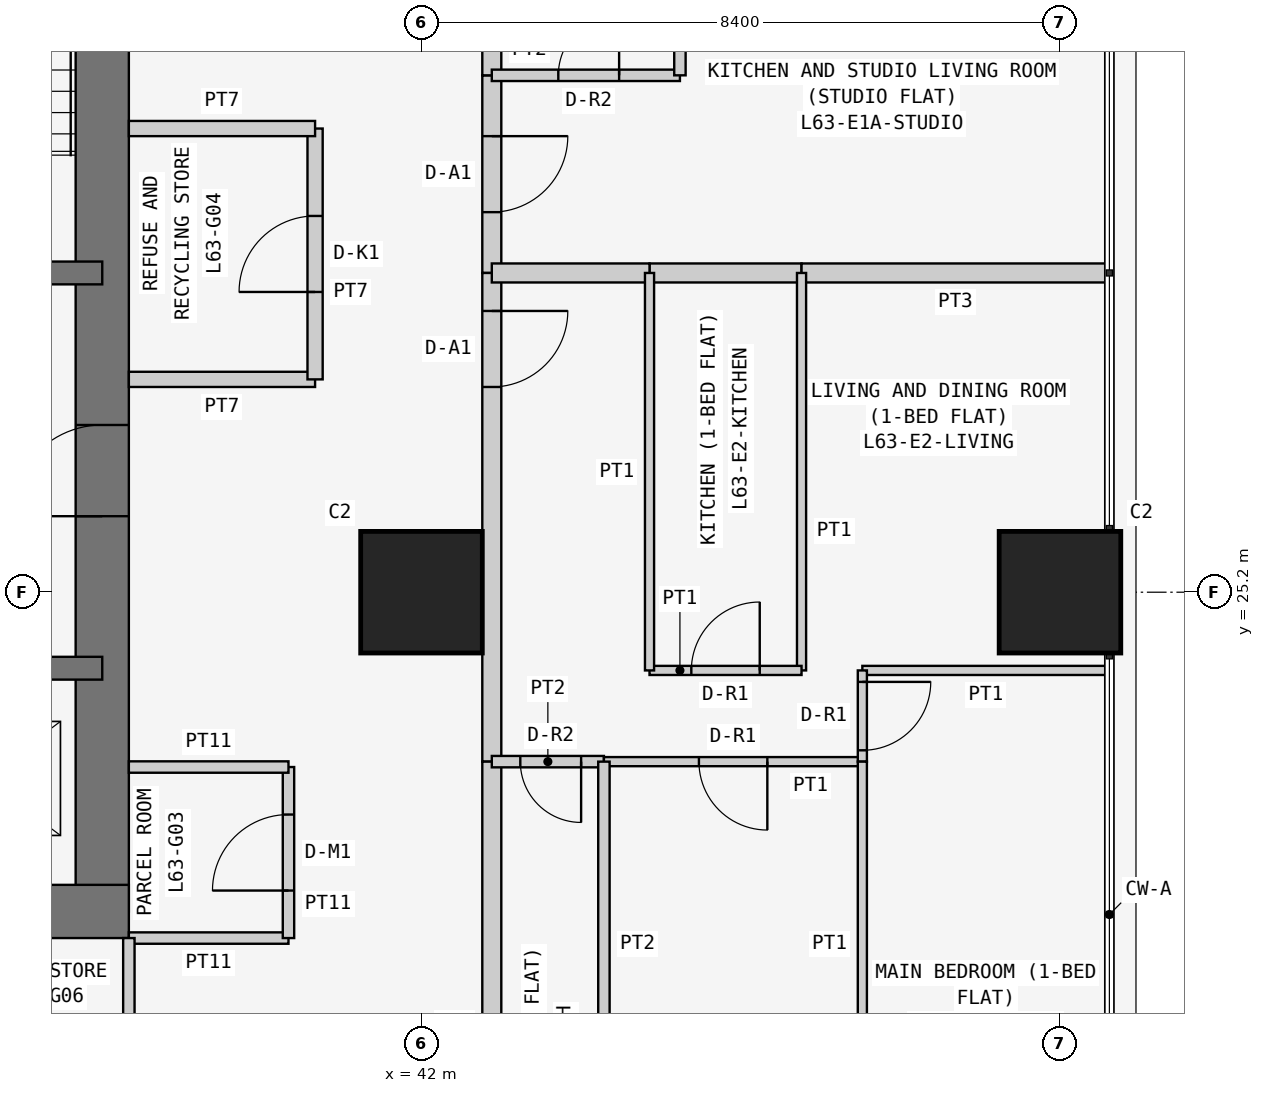
"""IFC4 building model, lengths in metres.
Left out: names, types, materials, properties, quantities, classifications, styles, units other than length and angle.
Written with IfcOpenShell. Run it as: python <this file> out.ifc"""

import sys

from ifc_helpers import new_model, si_unit, direction, frame, frame_2d, origin, origin_2d, place, context, subcontext, project, spatial, rectangle, extrude, element, fill, save


model = new_model("IFC4")
c1 = context("Model", 3, precision=1e-05, world=origin(), true_north=direction((0.0, 1.0)))
c2 = subcontext(c1, "Body", "Model", "MODEL_VIEW")
j1 = project(units=[si_unit("LENGTHUNIT", "METRE"), si_unit("PLANEANGLEUNIT", "RADIAN")], contexts=[c1])
p1 = place(None, origin())
s1 = spatial("IfcSite", under=j1, at=p1, CompositionType="ELEMENT")
p2 = place(p1, origin())
s2 = spatial("IfcBuilding", under=s1, at=p2, CompositionType="ELEMENT")
p3 = place(p2, frame((0.0, 0.0, 240.9)))
s3 = spatial("IfcBuildingStorey", under=s2, at=p3, CompositionType="ELEMENT", Elevation=240.9)
for number, where, z_axis, x_axis in (
    (1, (42.0, 25.2, 0.0), (0.0, 0.0, 1.0), (1.0, 0.0, 0.0)),
    (2, (50.4, 25.2, 0.0), (0.0, 0.0, 1.0), (1.0, 0.0, 0.0)),
):
    element("IfcColumn", number, at=place(p3, frame(where, z_axis=z_axis, x_axis=x_axis)), inside=s3, PredefinedType="COLUMN", context=c2, shape_type="SweptSolid", body=[
        extrude(rectangle(XDim=1.6, YDim=1.6, at=origin_2d()), origin(), (0.0, 0.0, 1.0), 3.6),
    ])
p4 = place(p3, frame((21.0, 21.0, 0.0), z_axis=(0.0, 0.0, 1.0), x_axis=(1.0, 0.0, 0.0)))
e3 = element("IfcWall", 3, at=p4, inside=s3, PredefinedType="SHEAR", context=c2, shape_type="SweptSolid", body=[
    extrude(rectangle(XDim=17.15, YDim=0.7, at=frame_2d((8.575, 0.0))), origin(), (0.0, 0.0, 1.0), 3.6),
])
p5 = place(p3, frame((37.8, 21.0, 0.0), z_axis=(0.0, 0.0, 1.0), x_axis=(0.0, 1.0, 0.0)))
e4 = element("IfcWall", 4, at=p5, inside=s3, PredefinedType="SHEAR", context=c2, shape_type="SweptSolid", body=[
    extrude(rectangle(XDim=17.15, YDim=0.7, at=frame_2d((8.575, 0.0))), origin(), (0.0, 0.0, 1.0), 3.6),
])
p6 = place(p5, frame((5.2, 0.0, 0.0)))
e5 = element("IfcOpeningElement", 5, at=p6, cuts=e4, PredefinedType="OPENING", context=c2, shape_type="SweptSolid", body=[
    extrude(rectangle(XDim=1.2, YDim=2.1, at=frame_2d((0.6, 1.05))), frame((0.0, 0.36, 0.0), z_axis=(0.0, -1.0, 0.0), x_axis=(1.0, 0.0, 0.0)), (0.0, 0.0, 1.0), 0.72),
])
p7 = place(p3, frame((26.6, 24.2, 0.0), z_axis=(0.0, 0.0, 1.0), x_axis=(1.0, 0.0, 0.0)))
e6 = element("IfcWall", 6, at=p7, inside=s3, PredefinedType="SHEAR", context=c2, shape_type="SweptSolid", body=[
    extrude(rectangle(XDim=11.2, YDim=0.3, at=frame_2d((5.6, 0.0))), origin(), (0.0, 0.0, 1.0), 3.6),
])
p8 = place(p7, frame((0.913, 0.0, 0.0)))
e7 = element("IfcOpeningElement", 7, at=p8, cuts=e6, PredefinedType="OPENING", context=c2, shape_type="SweptSolid", body=[
    extrude(rectangle(XDim=1.0, YDim=2.1, at=frame_2d((0.5, 1.05))), frame((0.0, 0.16, 0.0), z_axis=(0.0, -1.0, 0.0), x_axis=(1.0, 0.0, 0.0)), (0.0, 0.0, 1.0), 0.32),
])
p9 = place(p7, frame((3.75, 0.0, 0.0)))
e8 = element("IfcOpeningElement", 8, at=p9, cuts=e6, PredefinedType="OPENING", context=c2, shape_type="SweptSolid", body=[
    extrude(rectangle(XDim=0.9, YDim=2.1, at=frame_2d((0.45, 1.05))), frame((0.0, 0.16, 0.0), z_axis=(0.0, -1.0, 0.0), x_axis=(1.0, 0.0, 0.0)), (0.0, 0.0, 1.0), 0.32),
])
p10 = place(p7, frame((6.45, 0.0, 0.0)))
e9 = element("IfcOpeningElement", 9, at=p10, cuts=e6, PredefinedType="OPENING", context=c2, shape_type="SweptSolid", body=[
    extrude(rectangle(XDim=1.1, YDim=2.1, at=frame_2d((0.55, 1.05))), frame((0.0, 0.16, 0.0), z_axis=(0.0, -1.0, 0.0), x_axis=(1.0, 0.0, 0.0)), (0.0, 0.0, 1.0), 0.32),
])
p11 = place(p7, frame((9.1, 0.0, 0.0)))
e10 = element("IfcOpeningElement", 10, at=p11, cuts=e6, PredefinedType="OPENING", context=c2, shape_type="SweptSolid", body=[
    extrude(rectangle(XDim=1.1, YDim=2.1, at=frame_2d((0.55, 1.05))), frame((0.0, 0.16, 0.0), z_axis=(0.0, -1.0, 0.0), x_axis=(1.0, 0.0, 0.0)), (0.0, 0.0, 1.0), 0.32),
])
p12 = place(p3, frame((32.2, 29.4, 0.0), z_axis=(0.0, 0.0, 1.0), x_axis=(1.0, 0.0, 0.0)))
e11 = element("IfcWall", 11, at=p12, inside=s3, PredefinedType="SHEAR", context=c2, shape_type="SweptSolid", body=[
    extrude(rectangle(XDim=5.6, YDim=0.3, at=frame_2d((2.8, 0.0))), origin(), (0.0, 0.0, 1.0), 3.6),
])
p13 = place(p12, frame((2.0, 0.0, 0.0)))
e12 = element("IfcOpeningElement", 12, at=p13, cuts=e11, PredefinedType="OPENING", context=c2, shape_type="SweptSolid", body=[
    extrude(rectangle(XDim=1.2, YDim=2.1, at=frame_2d((0.6, 1.05))), frame((0.0, 0.16, 0.0), z_axis=(0.0, -1.0, 0.0), x_axis=(1.0, 0.0, 0.0)), (0.0, 0.0, 1.0), 0.32),
])
p14 = place(p3, frame((38.15, 20.65, 0.0), z_axis=(0.0, 0.0, 1.0), x_axis=(1.0, 0.0, 0.0)))
e13 = element("IfcWall", 13, at=p14, inside=s3, PredefinedType="PARTITIONING", context=c2, shape_type="SweptSolid", body=[
    extrude(rectangle(XDim=2.1, YDim=0.15, at=frame_2d((1.05, 0.0))), origin(), (0.0, 0.0, 1.0), 3.45),
])
p15 = place(p3, frame((40.25, 20.65, 0.0), z_axis=(0.0, 0.0, 1.0), x_axis=(0.0, 1.0, 0.0)))
e14 = element("IfcWall", 14, at=p15, inside=s3, PredefinedType="PARTITIONING", context=c2, shape_type="SweptSolid", body=[
    extrude(rectangle(XDim=2.25, YDim=0.15, at=frame_2d((1.125, 0.0))), origin(), (0.0, 0.0, 1.0), 3.45),
])
p16 = place(p15, frame((0.625, 0.0, 0.0)))
e15 = element("IfcOpeningElement", 15, at=p16, cuts=e14, PredefinedType="OPENING", context=c2, shape_type="SweptSolid", body=[
    extrude(rectangle(XDim=1.0, YDim=2.1, at=frame_2d((0.5, 1.05))), frame((0.0, 0.085, 0.0), z_axis=(0.0, -1.0, 0.0), x_axis=(1.0, 0.0, 0.0)), (0.0, 0.0, 1.0), 0.17),
])
p17 = place(p3, frame((40.25, 22.9, 0.0), z_axis=(0.0, 0.0, 1.0), x_axis=(-1.0, 0.0, 0.0)))
e16 = element("IfcWall", 16, at=p17, inside=s3, PredefinedType="PARTITIONING", context=c2, shape_type="SweptSolid", body=[
    extrude(rectangle(XDim=2.1, YDim=0.15, at=frame_2d((1.05, 0.0))), origin(), (0.0, 0.0, 1.0), 3.45),
])
p18 = place(p3, frame((38.15, 28.0, 0.0), z_axis=(0.0, 0.0, 1.0), x_axis=(1.0, 0.0, 0.0)))
e17 = element("IfcWall", 17, at=p18, inside=s3, PredefinedType="PARTITIONING", context=c2, shape_type="SweptSolid", body=[
    extrude(rectangle(XDim=2.45, YDim=0.2, at=frame_2d((1.225, 0.0))), origin(), (0.0, 0.0, 1.0), 3.45),
])
p19 = place(p3, frame((40.6, 28.0, 0.0), z_axis=(0.0, 0.0, 1.0), x_axis=(0.0, 1.0, 0.0)))
e18 = element("IfcWall", 18, at=p19, inside=s3, PredefinedType="PARTITIONING", context=c2, shape_type="SweptSolid", body=[
    extrude(rectangle(XDim=3.3, YDim=0.2, at=frame_2d((1.65, 0.0))), origin(), (0.0, 0.0, 1.0), 3.45),
])
p20 = place(p19, frame((1.15, 0.0, 0.0)))
e19 = element("IfcOpeningElement", 19, at=p20, cuts=e18, PredefinedType="OPENING", context=c2, shape_type="SweptSolid", body=[
    extrude(rectangle(XDim=1.0, YDim=2.1, at=frame_2d((0.5, 1.05))), frame((0.0, 0.11, 0.0), z_axis=(0.0, -1.0, 0.0), x_axis=(1.0, 0.0, 0.0)), (0.0, 0.0, 1.0), 0.22),
])
p21 = place(p3, frame((40.6, 31.3, 0.0), z_axis=(0.0, 0.0, 1.0), x_axis=(-1.0, 0.0, 0.0)))
e20 = element("IfcWall", 20, at=p21, inside=s3, PredefinedType="PARTITIONING", context=c2, shape_type="SweptSolid", body=[
    extrude(rectangle(XDim=2.45, YDim=0.2, at=frame_2d((1.225, 0.0))), origin(), (0.0, 0.0, 1.0), 3.45),
])
p22 = place(p3, frame((38.15, 18.2, 0.0), z_axis=(0.0, 0.0, 1.0), x_axis=(0.0, 1.0, 0.0)))
e21 = element("IfcWall", 21, at=p22, inside=s3, PredefinedType="PARTITIONING", context=c2, shape_type="SweptSolid", body=[
    extrude(rectangle(XDim=2.45, YDim=0.15, at=frame_2d((1.225, 0.0))), origin(), (0.0, 0.0, 1.0), 3.45),
])
p23 = place(p3, frame((42.925, 32.0, 0.0), z_axis=(0.0, 0.0, 1.0), x_axis=(0.0, -1.0, 0.0)))
e22 = element("IfcWall", 22, at=p23, inside=s3, PredefinedType="PARTITIONING", context=c2, shape_type="SweptSolid", body=[
    extrude(rectangle(XDim=2.6, YDim=0.25, at=frame_2d((1.3, 0.0))), origin(), (0.0, 0.0, 1.0), 3.45),
])
p24 = place(p23, frame((0.8, 0.0, 0.0)))
e23 = element("IfcOpeningElement", 23, at=p24, cuts=e22, PredefinedType="OPENING", context=c2, shape_type="SweptSolid", body=[
    extrude(rectangle(XDim=1.0, YDim=2.1, at=frame_2d((0.5, 1.05))), frame((0.0, 0.135, 0.0), z_axis=(0.0, -1.0, 0.0), x_axis=(1.0, 0.0, 0.0)), (0.0, 0.0, 1.0), 0.27),
])
p25 = place(p3, frame((42.925, 34.629, 0.0), z_axis=(0.0, 0.0, 1.0), x_axis=(0.0, -1.0, 0.0)))
e24 = element("IfcWall", 24, at=p25, inside=s3, PredefinedType="PARTITIONING", context=c2, shape_type="SweptSolid", body=[
    extrude(rectangle(XDim=2.629, YDim=0.25, at=frame_2d((1.314, 0.0))), origin(), (0.0, 0.0, 1.0), 3.45),
])
p26 = place(p3, frame((42.925, 29.4, 0.0), z_axis=(0.0, 0.0, 1.0), x_axis=(0.0, -1.0, 0.0)))
e25 = element("IfcWall", 25, at=p26, inside=s3, PredefinedType="PARTITIONING", context=c2, shape_type="SweptSolid", body=[
    extrude(rectangle(XDim=6.429, YDim=0.25, at=frame_2d((3.214, 0.0))), origin(), (0.0, 0.0, 1.0), 3.45),
])
p27 = place(p26, frame((0.5, 0.0, 0.0)))
e26 = element("IfcOpeningElement", 26, at=p27, cuts=e25, PredefinedType="OPENING", context=c2, shape_type="SweptSolid", body=[
    extrude(rectangle(XDim=1.0, YDim=2.1, at=frame_2d((0.5, 1.05))), frame((0.0, 0.135, 0.0), z_axis=(0.0, -1.0, 0.0), x_axis=(1.0, 0.0, 0.0)), (0.0, 0.0, 1.0), 0.27),
])
p28 = place(p3, frame((42.925, 22.971, 0.0), z_axis=(0.0, 0.0, 1.0), x_axis=(0.0, -1.0, 0.0)))
e27 = element("IfcWall", 27, at=p28, inside=s3, PredefinedType="PARTITIONING", context=c2, shape_type="SweptSolid", body=[
    extrude(rectangle(XDim=6.871, YDim=0.25, at=frame_2d((3.436, 0.0))), origin(), (0.0, 0.0, 1.0), 3.45),
])
p29 = place(p3, frame((42.925, 32.0, 0.0), z_axis=(0.0, 0.0, 1.0), x_axis=(1.0, 0.0, 0.0)))
e28 = element("IfcWall", 28, at=p29, inside=s3, PredefinedType="PARTITIONING", context=c2, shape_type="SweptSolid", body=[
    extrude(rectangle(XDim=2.475, YDim=0.15, at=frame_2d((1.237, 0.0))), origin(), (0.0, 0.0, 1.0), 3.45),
])
p30 = place(p29, frame((0.875, 0.0, 0.0)))
e29 = element("IfcOpeningElement", 29, at=p30, cuts=e28, PredefinedType="OPENING", context=c2, shape_type="SweptSolid", body=[
    extrude(rectangle(XDim=0.8, YDim=2.1, at=frame_2d((0.4, 1.05))), frame((0.0, 0.085, 0.0), z_axis=(0.0, -1.0, 0.0), x_axis=(1.0, 0.0, 0.0)), (0.0, 0.0, 1.0), 0.17),
])
p31 = place(p3, frame((45.4, 32.0, 0.0), z_axis=(0.0, 0.0, 1.0), x_axis=(0.0, 1.0, 0.0)))
e30 = element("IfcWall", 30, at=p31, inside=s3, PredefinedType="PARTITIONING", context=c2, shape_type="SweptSolid", body=[
    extrude(rectangle(XDim=2.629, YDim=0.15, at=frame_2d((1.314, 0.0))), origin(), (0.0, 0.0, 1.0), 3.45),
])
p32 = place(p3, frame((47.0, 29.4, 0.0), z_axis=(0.0, 0.0, 1.0), x_axis=(-1.0, 0.0, 0.0)))
e31 = element("IfcWall", 31, at=p32, inside=s3, PredefinedType="PARTITIONING", context=c2, shape_type="SweptSolid", body=[
    extrude(rectangle(XDim=2.0, YDim=0.25, at=frame_2d((1.0, 0.0))), origin(), (0.0, 0.0, 1.0), 3.45),
])
p33 = place(p3, frame((45.0, 29.4, 0.0), z_axis=(0.0, 0.0, 1.0), x_axis=(-1.0, 0.0, 0.0)))
e32 = element("IfcWall", 32, at=p33, inside=s3, PredefinedType="PARTITIONING", context=c2, shape_type="SweptSolid", body=[
    extrude(rectangle(XDim=2.075, YDim=0.25, at=frame_2d((1.038, 0.0))), origin(), (0.0, 0.0, 1.0), 3.45),
])
p34 = place(p3, frame((51.05, 29.4, 0.0), z_axis=(0.0, 0.0, 1.0), x_axis=(-1.0, 0.0, 0.0)))
e33 = element("IfcWall", 33, at=p34, inside=s3, PredefinedType="PARTITIONING", context=c2, shape_type="SweptSolid", body=[
    extrude(rectangle(XDim=4.05, YDim=0.25, at=frame_2d((2.025, 0.0))), origin(), (0.0, 0.0, 1.0), 3.45),
])
p35 = place(p3, frame((47.0, 29.4, 0.0), z_axis=(0.0, 0.0, 1.0), x_axis=(0.0, -1.0, 0.0)))
e34 = element("IfcWall", 34, at=p35, inside=s3, PredefinedType="PARTITIONING", context=c2, shape_type="SweptSolid", body=[
    extrude(rectangle(XDim=5.229, YDim=0.12, at=frame_2d((2.615, 0.0))), origin(), (0.0, 0.0, 1.0), 3.45),
])
p36 = place(p3, frame((47.0, 24.171, 0.0), z_axis=(0.0, 0.0, 1.0), x_axis=(-1.0, 0.0, 0.0)))
e35 = element("IfcWall", 35, at=p36, inside=s3, PredefinedType="PARTITIONING", context=c2, shape_type="SweptSolid", body=[
    extrude(rectangle(XDim=2.0, YDim=0.12, at=frame_2d((1.0, 0.0))), origin(), (0.0, 0.0, 1.0), 3.45),
])
p37 = place(p36, frame((0.55, 0.0, 0.0)))
e36 = element("IfcOpeningElement", 36, at=p37, cuts=e35, PredefinedType="OPENING", context=c2, shape_type="SweptSolid", body=[
    extrude(rectangle(XDim=0.9, YDim=2.1, at=frame_2d((0.45, 1.05))), frame((0.0, 0.07, 0.0), z_axis=(0.0, -1.0, 0.0), x_axis=(1.0, 0.0, 0.0)), (0.0, 0.0, 1.0), 0.14),
])
p38 = place(p3, frame((45.0, 24.171, 0.0), z_axis=(0.0, 0.0, 1.0), x_axis=(0.0, 1.0, 0.0)))
e37 = element("IfcWall", 37, at=p38, inside=s3, PredefinedType="PARTITIONING", context=c2, shape_type="SweptSolid", body=[
    extrude(rectangle(XDim=5.229, YDim=0.12, at=frame_2d((2.615, 0.0))), origin(), (0.0, 0.0, 1.0), 3.45),
])
p39 = place(p3, frame((44.4, 22.971, 0.0), z_axis=(0.0, 0.0, 1.0), x_axis=(-1.0, 0.0, 0.0)))
e38 = element("IfcWall", 38, at=p39, inside=s3, PredefinedType="PARTITIONING", context=c2, shape_type="SweptSolid", body=[
    extrude(rectangle(XDim=1.475, YDim=0.15, at=frame_2d((0.737, 0.0))), origin(), (0.0, 0.0, 1.0), 3.45),
])
p40 = place(p39, frame((0.3, 0.0, 0.0)))
e39 = element("IfcOpeningElement", 39, at=p40, cuts=e38, PredefinedType="OPENING", context=c2, shape_type="SweptSolid", body=[
    extrude(rectangle(XDim=0.8, YDim=2.1, at=frame_2d((0.4, 1.05))), frame((0.0, 0.085, 0.0), z_axis=(0.0, -1.0, 0.0), x_axis=(1.0, 0.0, 0.0)), (0.0, 0.0, 1.0), 0.17),
])
p41 = place(p3, frame((47.8, 22.971, 0.0), z_axis=(0.0, 0.0, 1.0), x_axis=(-1.0, 0.0, 0.0)))
e40 = element("IfcWall", 40, at=p41, inside=s3, PredefinedType="PARTITIONING", context=c2, shape_type="SweptSolid", body=[
    extrude(rectangle(XDim=3.4, YDim=0.12, at=frame_2d((1.7, 0.0))), origin(), (0.0, 0.0, 1.0), 3.45),
])
p42 = place(p41, frame((1.25, 0.0, 0.0)))
e41 = element("IfcOpeningElement", 41, at=p42, cuts=e40, PredefinedType="OPENING", context=c2, shape_type="SweptSolid", body=[
    extrude(rectangle(XDim=0.9, YDim=2.1, at=frame_2d((0.45, 1.05))), frame((0.0, 0.07, 0.0), z_axis=(0.0, -1.0, 0.0), x_axis=(1.0, 0.0, 0.0)), (0.0, 0.0, 1.0), 0.14),
])
p43 = place(p3, frame((51.05, 24.171, 0.0), z_axis=(0.0, 0.0, 1.0), x_axis=(-1.0, 0.0, 0.0)))
e42 = element("IfcWall", 42, at=p43, inside=s3, PredefinedType="PARTITIONING", context=c2, shape_type="SweptSolid", body=[
    extrude(rectangle(XDim=3.25, YDim=0.12, at=frame_2d((1.625, 0.0))), origin(), (0.0, 0.0, 1.0), 3.45),
])
p44 = place(p3, frame((47.8, 24.171, 0.0), z_axis=(0.0, 0.0, 1.0), x_axis=(0.0, -1.0, 0.0)))
e43 = element("IfcWall", 43, at=p44, inside=s3, PredefinedType="PARTITIONING", context=c2, shape_type="SweptSolid", body=[
    extrude(rectangle(XDim=1.2, YDim=0.12, at=frame_2d((0.6, 0.0))), origin(), (0.0, 0.0, 1.0), 3.45),
])
p45 = place(p44, frame((0.151, 0.0, 0.0)))
e44 = element("IfcOpeningElement", 44, at=p45, cuts=e43, PredefinedType="OPENING", context=c2, shape_type="SweptSolid", body=[
    extrude(rectangle(XDim=0.9, YDim=2.1, at=frame_2d((0.45, 1.05))), frame((0.0, 0.07, 0.0), z_axis=(0.0, -1.0, 0.0), x_axis=(1.0, 0.0, 0.0)), (0.0, 0.0, 1.0), 0.14),
])
p46 = place(p3, frame((44.4, 22.971, 0.0), z_axis=(0.0, 0.0, 1.0), x_axis=(0.0, -1.0, 0.0)))
e45 = element("IfcWall", 45, at=p46, inside=s3, PredefinedType="PARTITIONING", context=c2, shape_type="SweptSolid", body=[
    extrude(rectangle(XDim=6.871, YDim=0.15, at=frame_2d((3.436, 0.0))), origin(), (0.0, 0.0, 1.0), 3.45),
])
p47 = place(p3, frame((47.8, 22.971, 0.0), z_axis=(0.0, 0.0, 1.0), x_axis=(0.0, -1.0, 0.0)))
e46 = element("IfcWall", 46, at=p47, inside=s3, PredefinedType="PARTITIONING", context=c2, shape_type="SweptSolid", body=[
    extrude(rectangle(XDim=6.871, YDim=0.12, at=frame_2d((3.436, 0.0))), origin(), (0.0, 0.0, 1.0), 3.45),
])
p48 = place(p16, origin())
e47 = element("IfcDoor", 47, at=p48, inside=s3, OperationType="SINGLE_SWING_LEFT", PredefinedType="DOOR", context=c2, shape_type="SweptSolid", body=[
    extrude(rectangle(XDim=1.0, YDim=2.1, at=frame_2d((0.5, 1.05))), frame((0.0, 0.025, 0.0), z_axis=(0.0, -1.0, 0.0), x_axis=(1.0, 0.0, 0.0)), (0.0, 0.0, 1.0), 0.05),
])
fill(e15, e47)
p49 = place(p20, origin())
e48 = element("IfcDoor", 48, at=p49, inside=s3, OperationType="SINGLE_SWING_LEFT", PredefinedType="DOOR", context=c2, shape_type="SweptSolid", body=[
    extrude(rectangle(XDim=1.0, YDim=2.1, at=frame_2d((0.5, 1.05))), frame((0.0, 0.025, 0.0), z_axis=(0.0, -1.0, 0.0), x_axis=(1.0, 0.0, 0.0)), (0.0, 0.0, 1.0), 0.05),
])
fill(e19, e48)
p50 = place(p24, origin())
e49 = element("IfcDoor", 49, at=p50, inside=s3, OperationType="SINGLE_SWING_LEFT", PredefinedType="DOOR", context=c2, shape_type="SweptSolid", body=[
    extrude(rectangle(XDim=1.0, YDim=2.1, at=frame_2d((0.5, 1.05))), frame((0.0, 0.025, 0.0), z_axis=(0.0, -1.0, 0.0), x_axis=(1.0, 0.0, 0.0)), (0.0, 0.0, 1.0), 0.05),
])
fill(e23, e49)
p51 = place(p30, origin())
e50 = element("IfcDoor", 50, at=p51, inside=s3, OperationType="SINGLE_SWING_RIGHT", PredefinedType="DOOR", context=c2, shape_type="SweptSolid", body=[
    extrude(rectangle(XDim=0.8, YDim=2.1, at=frame_2d((0.4, 1.05))), frame((0.0, 0.025, 0.0), z_axis=(0.0, -1.0, 0.0), x_axis=(1.0, 0.0, 0.0)), (0.0, 0.0, 1.0), 0.05),
])
fill(e29, e50)
p52 = place(p27, origin())
e51 = element("IfcDoor", 51, at=p52, inside=s3, OperationType="SINGLE_SWING_LEFT", PredefinedType="DOOR", context=c2, shape_type="SweptSolid", body=[
    extrude(rectangle(XDim=1.0, YDim=2.1, at=frame_2d((0.5, 1.05))), frame((0.0, 0.025, 0.0), z_axis=(0.0, -1.0, 0.0), x_axis=(1.0, 0.0, 0.0)), (0.0, 0.0, 1.0), 0.05),
])
fill(e26, e51)
p53 = place(p37, frame((0.9, 0.0, 0.0), z_axis=(0.0, 0.0, 1.0), x_axis=(-1.0, 0.0, 0.0)))
e52 = element("IfcDoor", 52, at=p53, inside=s3, OperationType="SINGLE_SWING_RIGHT", PredefinedType="DOOR", context=c2, shape_type="SweptSolid", body=[
    extrude(rectangle(XDim=0.9, YDim=2.1, at=frame_2d((0.45, 1.05))), frame((0.0, 0.025, 0.0), z_axis=(0.0, -1.0, 0.0), x_axis=(1.0, 0.0, 0.0)), (0.0, 0.0, 1.0), 0.05),
])
fill(e36, e52)
p54 = place(p40, origin())
e53 = element("IfcDoor", 53, at=p54, inside=s3, OperationType="SINGLE_SWING_LEFT", PredefinedType="DOOR", context=c2, shape_type="SweptSolid", body=[
    extrude(rectangle(XDim=0.8, YDim=2.1, at=frame_2d((0.4, 1.05))), frame((0.0, 0.025, 0.0), z_axis=(0.0, -1.0, 0.0), x_axis=(1.0, 0.0, 0.0)), (0.0, 0.0, 1.0), 0.05),
])
fill(e39, e53)
p55 = place(p42, origin())
e54 = element("IfcDoor", 54, at=p55, inside=s3, OperationType="SINGLE_SWING_LEFT", PredefinedType="DOOR", context=c2, shape_type="SweptSolid", body=[
    extrude(rectangle(XDim=0.9, YDim=2.1, at=frame_2d((0.45, 1.05))), frame((0.0, 0.025, 0.0), z_axis=(0.0, -1.0, 0.0), x_axis=(1.0, 0.0, 0.0)), (0.0, 0.0, 1.0), 0.05),
])
fill(e41, e54)
p56 = place(p45, origin())
e55 = element("IfcDoor", 55, at=p56, inside=s3, OperationType="SINGLE_SWING_LEFT", PredefinedType="DOOR", context=c2, shape_type="SweptSolid", body=[
    extrude(rectangle(XDim=0.9, YDim=2.1, at=frame_2d((0.45, 1.05))), frame((0.0, 0.025, 0.0), z_axis=(0.0, -1.0, 0.0), x_axis=(1.0, 0.0, 0.0)), (0.0, 0.0, 1.0), 0.05),
])
fill(e44, e55)
p57 = place(p6, origin())
e56 = element("IfcDoor", 56, at=p57, inside=s3, OperationType="SINGLE_SWING_LEFT", PredefinedType="DOOR", context=c2, shape_type="SweptSolid", body=[
    extrude(rectangle(XDim=1.2, YDim=2.1, at=frame_2d((0.6, 1.05))), frame((0.0, 0.025, 0.0), z_axis=(0.0, -1.0, 0.0), x_axis=(1.0, 0.0, 0.0)), (0.0, 0.0, 1.0), 0.05),
])
fill(e5, e56)
save(model, sys.argv[1])
